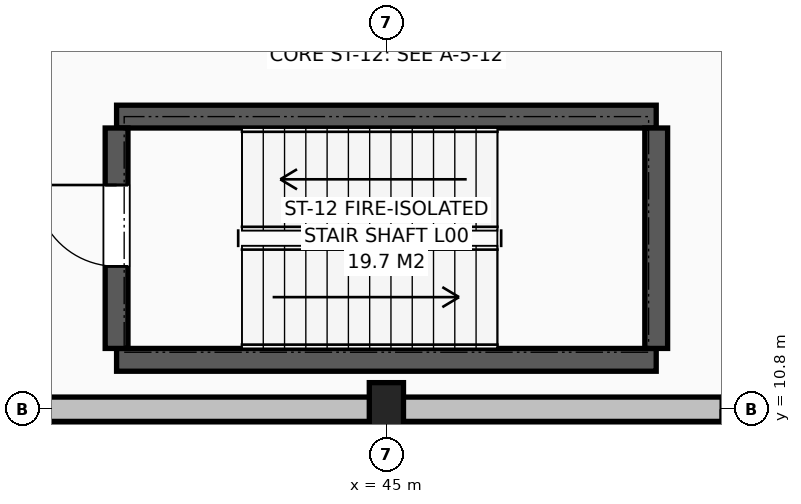
"""IFC4 building model, lengths in metres.
Left out: names, types, materials, properties, quantities, classifications, styles, units other than length and angle.
Written with IfcOpenShell. Run it as: python <this file> out.ifc"""

import sys

from ifc_helpers import new_model, si_unit, direction, frame, frame_2d, origin, origin_2d, place, context, subcontext, project, spatial, rectangle, extrude, element, fill, save


model = new_model("IFC4")
c1 = context("Model", 3, precision=1e-05, world=origin(), true_north=direction((0.0, 1.0)))
c2 = subcontext(c1, "Body", "Model", "MODEL_VIEW")
j1 = project(units=[si_unit("LENGTHUNIT", "METRE"), si_unit("PLANEANGLEUNIT", "RADIAN")], contexts=[c1])
p1 = place(None, origin())
s1 = spatial("IfcSite", under=j1, at=p1, CompositionType="ELEMENT")
p2 = place(p1, origin())
s2 = spatial("IfcBuilding", under=s1, at=p2, CompositionType="ELEMENT")
p3 = place(p2, origin())
s3 = spatial("IfcBuildingStorey", under=s2, at=p3, CompositionType="ELEMENT", Elevation=0.0)
p4 = place(p3, frame((45.0, 10.8, 0.0), z_axis=(0.0, 0.0, 1.0), x_axis=(1.0, 0.0, 0.0)))
e1 = element("IfcColumn", 1, at=p4, inside=s3, PredefinedType="COLUMN", context=c2, shape_type="SweptSolid", body=[
    extrude(rectangle(XDim=0.45, YDim=0.7, at=origin_2d()), origin(), (0.0, 0.0, 1.0), 4.8),
])
p5 = place(p3, frame((0.0, 10.8, 0.0), z_axis=(0.0, 0.0, 1.0), x_axis=(1.0, 0.0, 0.0)))
e2 = element("IfcWall", 2, at=p5, inside=s3, PredefinedType="SOLIDWALL", context=c2, shape_type="SweptSolid", body=[
    extrude(rectangle(XDim=93.6, YDim=0.32, at=frame_2d((46.8, 0.0))), origin(), (0.0, 0.0, 1.0), 4.25),
])
p6 = place(p5, frame((2.2, 0.0, 0.72)))
e3 = element("IfcOpeningElement", 3, at=p6, cuts=e2, PredefinedType="OPENING", context=c2, shape_type="SweptSolid", body=[
    extrude(rectangle(XDim=1.35, YDim=2.05, at=frame_2d((0.675, 1.025))), frame((0.0, 0.17, 0.0), z_axis=(0.0, -1.0, 0.0), x_axis=(1.0, 0.0, 0.0)), (0.0, 0.0, 1.0), 0.34),
])
p7 = place(p5, frame((9.4, 0.0, 0.72)))
e4 = element("IfcOpeningElement", 4, at=p7, cuts=e2, PredefinedType="OPENING", context=c2, shape_type="SweptSolid", body=[
    extrude(rectangle(XDim=1.5, YDim=2.1, at=frame_2d((0.75, 1.05))), frame((0.0, 0.17, 0.0), z_axis=(0.0, -1.0, 0.0), x_axis=(1.0, 0.0, 0.0)), (0.0, 0.0, 1.0), 0.34),
])
p8 = place(p5, frame((16.6, 0.0, 0.72)))
e5 = element("IfcOpeningElement", 5, at=p8, cuts=e2, PredefinedType="OPENING", context=c2, shape_type="SweptSolid", body=[
    extrude(rectangle(XDim=1.65, YDim=2.1, at=frame_2d((0.825, 1.05))), frame((0.0, 0.17, 0.0), z_axis=(0.0, -1.0, 0.0), x_axis=(1.0, 0.0, 0.0)), (0.0, 0.0, 1.0), 0.34),
])
p9 = place(p5, frame((23.8, 0.0, 0.72)))
e6 = element("IfcOpeningElement", 6, at=p9, cuts=e2, PredefinedType="OPENING", context=c2, shape_type="SweptSolid", body=[
    extrude(rectangle(XDim=1.8, YDim=2.15, at=frame_2d((0.9, 1.075))), frame((0.0, 0.17, 0.0), z_axis=(0.0, -1.0, 0.0), x_axis=(1.0, 0.0, 0.0)), (0.0, 0.0, 1.0), 0.34),
])
p10 = place(p5, frame((31.0, 0.0, 0.72)))
e7 = element("IfcOpeningElement", 7, at=p10, cuts=e2, PredefinedType="OPENING", context=c2, shape_type="SweptSolid", body=[
    extrude(rectangle(XDim=1.2, YDim=2.0, at=frame_2d((0.6, 1.0))), frame((0.0, 0.17, 0.0), z_axis=(0.0, -1.0, 0.0), x_axis=(1.0, 0.0, 0.0)), (0.0, 0.0, 1.0), 0.34),
])
p11 = place(p5, frame((38.2, 0.0, 0.72)))
e8 = element("IfcOpeningElement", 8, at=p11, cuts=e2, PredefinedType="OPENING", context=c2, shape_type="SweptSolid", body=[
    extrude(rectangle(XDim=1.35, YDim=2.05, at=frame_2d((0.675, 1.025))), frame((0.0, 0.17, 0.0), z_axis=(0.0, -1.0, 0.0), x_axis=(1.0, 0.0, 0.0)), (0.0, 0.0, 1.0), 0.34),
])
p12 = place(p5, frame((52.6, 0.0, 0.72)))
e9 = element("IfcOpeningElement", 9, at=p12, cuts=e2, PredefinedType="OPENING", context=c2, shape_type="SweptSolid", body=[
    extrude(rectangle(XDim=1.65, YDim=2.1, at=frame_2d((0.825, 1.05))), frame((0.0, 0.17, 0.0), z_axis=(0.0, -1.0, 0.0), x_axis=(1.0, 0.0, 0.0)), (0.0, 0.0, 1.0), 0.34),
])
p13 = place(p5, frame((67.0, 0.0, 0.72)))
e10 = element("IfcOpeningElement", 10, at=p13, cuts=e2, PredefinedType="OPENING", context=c2, shape_type="SweptSolid", body=[
    extrude(rectangle(XDim=1.2, YDim=2.0, at=frame_2d((0.6, 1.0))), frame((0.0, 0.17, 0.0), z_axis=(0.0, -1.0, 0.0), x_axis=(1.0, 0.0, 0.0)), (0.0, 0.0, 1.0), 0.34),
])
p14 = place(p5, frame((81.4, 0.0, 0.72)))
e11 = element("IfcOpeningElement", 11, at=p14, cuts=e2, PredefinedType="OPENING", context=c2, shape_type="SweptSolid", body=[
    extrude(rectangle(XDim=1.5, YDim=2.1, at=frame_2d((0.75, 1.05))), frame((0.0, 0.17, 0.0), z_axis=(0.0, -1.0, 0.0), x_axis=(1.0, 0.0, 0.0)), (0.0, 0.0, 1.0), 0.34),
])
p15 = place(p5, frame((6.2, 0.0, 0.0)))
e12 = element("IfcOpeningElement", 12, at=p15, cuts=e2, PredefinedType="OPENING", context=c2, shape_type="SweptSolid", body=[
    extrude(rectangle(XDim=2.0, YDim=2.35, at=frame_2d((1.0, 1.175))), frame((0.0, 0.17, 0.0), z_axis=(0.0, -1.0, 0.0), x_axis=(1.0, 0.0, 0.0)), (0.0, 0.0, 1.0), 0.34),
])
p16 = place(p5, frame((20.6, 0.0, 0.0)))
e13 = element("IfcOpeningElement", 13, at=p16, cuts=e2, PredefinedType="OPENING", context=c2, shape_type="SweptSolid", body=[
    extrude(rectangle(XDim=1.05, YDim=2.1, at=frame_2d((0.525, 1.05))), frame((0.0, 0.17, 0.0), z_axis=(0.0, -1.0, 0.0), x_axis=(1.0, 0.0, 0.0)), (0.0, 0.0, 1.0), 0.34),
])
p17 = place(p5, frame((35.0, 0.0, 0.0)))
e14 = element("IfcOpeningElement", 14, at=p17, cuts=e2, PredefinedType="OPENING", context=c2, shape_type="SweptSolid", body=[
    extrude(rectangle(XDim=2.0, YDim=2.35, at=frame_2d((1.0, 1.175))), frame((0.0, 0.17, 0.0), z_axis=(0.0, -1.0, 0.0), x_axis=(1.0, 0.0, 0.0)), (0.0, 0.0, 1.0), 0.34),
])
p18 = place(p5, frame((49.4, 0.0, 0.0)))
e15 = element("IfcOpeningElement", 15, at=p18, cuts=e2, PredefinedType="OPENING", context=c2, shape_type="SweptSolid", body=[
    extrude(rectangle(XDim=2.0, YDim=2.35, at=frame_2d((1.0, 1.175))), frame((0.0, 0.17, 0.0), z_axis=(0.0, -1.0, 0.0), x_axis=(1.0, 0.0, 0.0)), (0.0, 0.0, 1.0), 0.34),
])
p19 = place(p5, frame((63.8, 0.0, 0.0)))
e16 = element("IfcOpeningElement", 16, at=p19, cuts=e2, PredefinedType="OPENING", context=c2, shape_type="SweptSolid", body=[
    extrude(rectangle(XDim=1.1, YDim=2.1, at=frame_2d((0.55, 1.05))), frame((0.0, 0.17, 0.0), z_axis=(0.0, -1.0, 0.0), x_axis=(1.0, 0.0, 0.0)), (0.0, 0.0, 1.0), 0.34),
])
for number, where, z_axis, x_axis in (
    (17, (41.45, 11.45, 0.0), (0.0, 0.0, 1.0), (1.0, 0.0, 0.0)),
    (18, (48.55, 14.65, 0.0), (0.0, 0.0, 1.0), (-1.0, 0.0, 0.0)),
):
    element("IfcWall", number, at=place(p3, frame(where, z_axis=z_axis, x_axis=x_axis)), inside=s3, PredefinedType="SHEAR", context=c2, shape_type="SweptSolid", body=[
        extrude(rectangle(XDim=7.1, YDim=0.3, at=frame_2d((3.55, 0.0))), origin(), (0.0, 0.0, 1.0), 4.5),
    ])
p20 = place(p3, frame((48.55, 11.6, 0.0), z_axis=(0.0, 0.0, 1.0), x_axis=(0.0, 1.0, 0.0)))
e19 = element("IfcWall", 19, at=p20, inside=s3, PredefinedType="SHEAR", context=c2, shape_type="SweptSolid", body=[
    extrude(rectangle(XDim=2.9, YDim=0.3, at=frame_2d((1.45, 0.0))), origin(), (0.0, 0.0, 1.0), 4.5),
])
p21 = place(p3, frame((41.45, 14.5, 0.0), z_axis=(0.0, 0.0, 1.0), x_axis=(0.0, -1.0, 0.0)))
e20 = element("IfcWall", 20, at=p21, inside=s3, PredefinedType="SHEAR", context=c2, shape_type="SweptSolid", body=[
    extrude(rectangle(XDim=2.9, YDim=0.3, at=frame_2d((1.45, 0.0))), origin(), (0.0, 0.0, 1.0), 4.5),
])
p22 = place(p21, frame((0.75, 0.0, 0.0)))
e21 = element("IfcOpeningElement", 21, at=p22, cuts=e20, PredefinedType="OPENING", context=c2, shape_type="SweptSolid", body=[
    extrude(rectangle(XDim=1.07, YDim=2.15, at=frame_2d((0.535, 1.075))), frame((0.0, 0.16, 0.0), z_axis=(0.0, -1.0, 0.0), x_axis=(1.0, 0.0, 0.0)), (0.0, 0.0, 1.0), 0.32),
])
p23 = place(p22, frame((1.07, 0.0, 0.0), z_axis=(0.0, 0.0, 1.0), x_axis=(-1.0, 0.0, 0.0)))
e22 = element("IfcDoor", 22, at=p23, inside=s3, OperationType="SINGLE_SWING_RIGHT", PredefinedType="DOOR", context=c2, shape_type="SweptSolid", body=[
    extrude(rectangle(XDim=1.07, YDim=2.15, at=frame_2d((0.535, 1.075))), frame((0.0, 0.025, 0.0), z_axis=(0.0, -1.0, 0.0), x_axis=(1.0, 0.0, 0.0)), (0.0, 0.0, 1.0), 0.05),
])
fill(e21, e22)
save(model, sys.argv[1])
